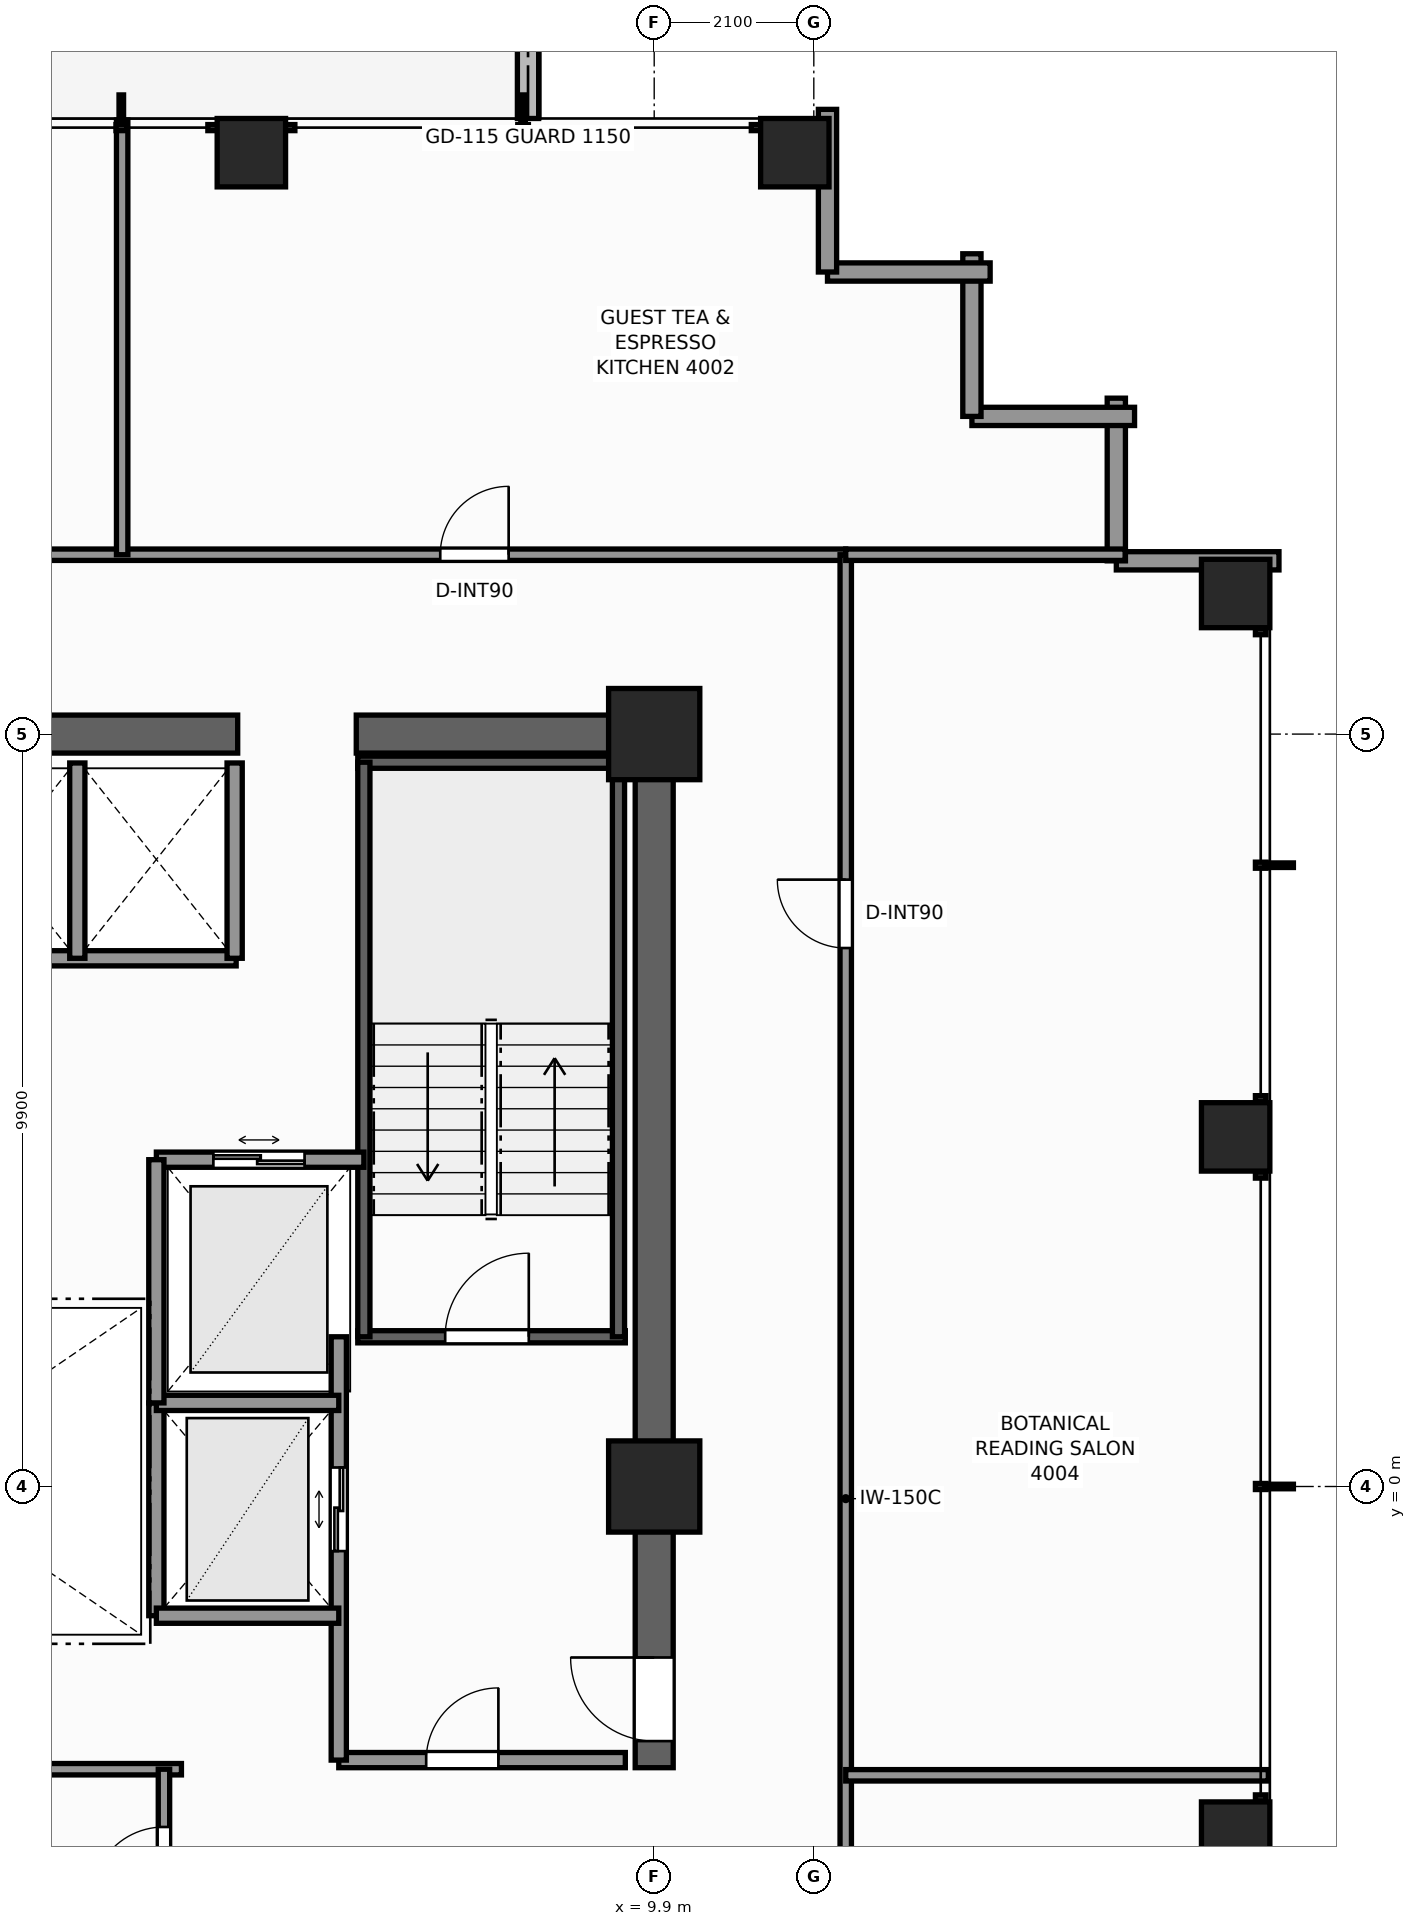
"""IFC4 building model, lengths in metres.
Left out: names, types, materials, properties, quantities, classifications, styles, units other than length and angle.
Written with IfcOpenShell. Run it as: python <this file> out.ifc"""

import sys

from ifc_helpers import new_model, si_unit, direction, frame, frame_2d, origin, origin_2d, place, context, subcontext, project, spatial, rectangle, extrude, element, fill, save


model = new_model("IFC4")
c1 = context("Model", 3, precision=1e-05, world=origin(), true_north=direction((0.0, 1.0)))
c2 = subcontext(c1, "Body", "Model", "MODEL_VIEW")
j1 = project(units=[si_unit("LENGTHUNIT", "METRE"), si_unit("PLANEANGLEUNIT", "RADIAN")], contexts=[c1])
p1 = place(None, origin())
s1 = spatial("IfcSite", under=j1, at=p1, CompositionType="ELEMENT")
p2 = place(p1, origin())
s2 = spatial("IfcBuilding", under=s1, at=p2, CompositionType="ELEMENT")
p3 = place(p2, frame((0.0, 0.0, 138.2)))
s3 = spatial("IfcBuildingStorey", under=s2, at=p3, CompositionType="ELEMENT", Elevation=138.2)
p4 = place(p3, frame((-10.15, 9.9, 0.0), z_axis=(0.0, 0.0, 1.0), x_axis=(1.0, 0.0, 0.0)))
e1 = element("IfcWall", 1, at=p4, inside=s3, PredefinedType="SHEAR", context=c2, shape_type="SweptSolid", body=[
    extrude(rectangle(XDim=14.57, YDim=0.5, at=frame_2d((7.285, 0.0))), origin(), (0.0, 0.0, 1.0), 3.3),
])
p5 = place(p3, frame((5.98, 9.9, 0.0), z_axis=(0.0, 0.0, 1.0), x_axis=(1.0, 0.0, 0.0)))
e2 = element("IfcWall", 2, at=p5, inside=s3, PredefinedType="SHEAR", context=c2, shape_type="SweptSolid", body=[
    extrude(rectangle(XDim=4.17, YDim=0.5, at=frame_2d((2.085, 0.0))), origin(), (0.0, 0.0, 1.0), 3.3),
])
p6 = place(p3, frame((9.9, -3.7, 0.0), z_axis=(0.0, 0.0, 1.0), x_axis=(0.0, 1.0, 0.0)))
e3 = element("IfcWall", 3, at=p6, inside=s3, PredefinedType="SHEAR", context=c2, shape_type="SweptSolid", body=[
    extrude(rectangle(XDim=13.35, YDim=0.5, at=frame_2d((6.675, 0.0))), origin(), (0.0, 0.0, 1.0), 3.3),
])
p7 = place(p6, frame((0.35, 0.0, 0.0)))
e4 = element("IfcOpeningElement", 4, at=p7, cuts=e3, PredefinedType="OPENING", context=c2, shape_type="SweptSolid", body=[
    extrude(rectangle(XDim=1.1, YDim=2.2, at=frame_2d((0.55, 1.1))), frame((0.0, 0.26, 0.0), z_axis=(0.0, -1.0, 0.0), x_axis=(1.0, 0.0, 0.0)), (0.0, 0.0, 1.0), 0.52),
])
for number, where, z_axis, x_axis in (
    (5, (9.9, 9.9, 0.0), (0.0, 0.0, 1.0), (1.0, 0.0, 0.0)),
    (6, (9.9, 0.0, 0.0), (0.0, 0.0, 1.0), (1.0, 0.0, 0.0)),
):
    element("IfcColumn", number, at=place(p3, frame(where, z_axis=z_axis, x_axis=x_axis)), inside=s3, PredefinedType="COLUMN", context=c2, shape_type="SweptSolid", body=[
        extrude(rectangle(XDim=1.2, YDim=1.2, at=origin_2d()), origin(), (0.0, 0.0, 1.0), 3.3),
    ])
for number, where, z_axis, x_axis in (
    (7, (4.6, 17.55, 0.0), (0.0, 0.0, 1.0), (1.0, 0.0, 0.0)),
    (8, (11.75, 17.55, 0.0), (0.0, 0.0, 1.0), (1.0, 0.0, 0.0)),
    (9, (17.55, -4.6, 0.0), (0.0, 0.0, 1.0), (1.0, 0.0, 0.0)),
    (10, (17.55, 4.6, 0.0), (0.0, 0.0, 1.0), (1.0, 0.0, 0.0)),
    (11, (17.55, 11.75, 0.0), (0.0, 0.0, 1.0), (1.0, 0.0, 0.0)),
):
    element("IfcColumn", number, at=place(p3, frame(where, z_axis=z_axis, x_axis=x_axis)), inside=s3, PredefinedType="COLUMN", context=c2, shape_type="SweptSolid", body=[
        extrude(rectangle(XDim=0.9, YDim=0.9, at=origin_2d()), origin(), (0.0, 0.0, 1.0), 3.3),
    ])
p8 = place(p3, frame((8.24, 18.0, -0.02), z_axis=(0.0, 0.0, 1.0), x_axis=(0.0, 1.0, 0.0)))
e12 = element("IfcWall", 12, at=p8, inside=s3, PredefinedType="PARAPET", context=c2, shape_type="SweptSolid", body=[
    extrude(rectangle(XDim=2.975, YDim=0.28, at=frame_2d((1.487, 0.0))), origin(), (0.0, 0.0, 1.0), 0.42),
])
for number, where, z_axis, x_axis in (
    (13, (15.98, 12.18, 0.0), (0.0, 0.0, 1.0), (1.0, 0.0, 0.0)),
    (14, (15.98, 14.32, 0.0), (0.0, 0.0, 1.0), (0.0, -1.0, 0.0)),
):
    element("IfcWall", number, at=place(p3, frame(where, z_axis=z_axis, x_axis=x_axis)), inside=s3, PredefinedType="STANDARD", context=c2, shape_type="SweptSolid", body=[
        extrude(rectangle(XDim=2.14, YDim=0.24, at=frame_2d((1.07, 0.0))), origin(), (0.0, 0.0, 1.0), 2.479),
    ])
for number, where, z_axis, x_axis in (
    (15, (14.08, 14.08, 0.0), (0.0, 0.0, 1.0), (1.0, 0.0, 0.0)),
    (16, (14.08, 16.22, 0.0), (0.0, 0.0, 1.0), (0.0, -1.0, 0.0)),
):
    element("IfcWall", number, at=place(p3, frame(where, z_axis=z_axis, x_axis=x_axis)), inside=s3, PredefinedType="STANDARD", context=c2, shape_type="SweptSolid", body=[
        extrude(rectangle(XDim=2.14, YDim=0.24, at=frame_2d((1.07, 0.0))), origin(), (0.0, 0.0, 1.0), 2.479),
    ])
for number, where, z_axis, x_axis in (
    (17, (12.18, 15.98, 0.0), (0.0, 0.0, 1.0), (1.0, 0.0, 0.0)),
    (18, (12.18, 18.12, 0.0), (0.0, 0.0, 1.0), (0.0, -1.0, 0.0)),
):
    element("IfcWall", number, at=place(p3, frame(where, z_axis=z_axis, x_axis=x_axis)), inside=s3, PredefinedType="STANDARD", context=c2, shape_type="SweptSolid", body=[
        extrude(rectangle(XDim=2.14, YDim=0.24, at=frame_2d((1.07, 0.0))), origin(), (0.0, 0.0, 1.0), 2.479),
    ])
p9 = place(p3, frame((6.0, 1.97, 0.0), z_axis=(0.0, 0.0, 1.0), x_axis=(1.0, 0.0, 0.0)))
e19 = element("IfcWall", 19, at=p9, inside=s3, PredefinedType="SHEAR", context=c2, shape_type="SweptSolid", body=[
    extrude(rectangle(XDim=3.52, YDim=0.16, at=frame_2d((1.76, 0.0))), origin(), (0.0, 0.0, 1.0), 3.3),
])
p10 = place(p9, frame((1.15, 0.0, 0.0)))
e20 = element("IfcOpeningElement", 20, at=p10, cuts=e19, PredefinedType="OPENING", context=c2, shape_type="SweptSolid", body=[
    extrude(rectangle(XDim=1.1, YDim=2.2, at=frame_2d((0.55, 1.1))), frame((0.0, 0.09, 0.0), z_axis=(0.0, -1.0, 0.0), x_axis=(1.0, 0.0, 0.0)), (0.0, 0.0, 1.0), 0.18),
])
p11 = place(p3, frame((6.0, 9.53, 0.0), z_axis=(0.0, 0.0, 1.0), x_axis=(1.0, 0.0, 0.0)))
e21 = element("IfcWall", 21, at=p11, inside=s3, PredefinedType="SHEAR", context=c2, shape_type="SweptSolid", body=[
    extrude(rectangle(XDim=3.52, YDim=0.16, at=frame_2d((1.76, 0.0))), origin(), (0.0, 0.0, 1.0), 3.3),
])
for number, where, z_axis, x_axis in (
    (22, (6.08, 1.97, 0.0), (0.0, 0.0, 1.0), (0.0, 1.0, 0.0)),
    (23, (9.43, 1.97, 0.0), (0.0, 0.0, 1.0), (0.0, 1.0, 0.0)),
):
    element("IfcWall", number, at=place(p3, frame(where, z_axis=z_axis, x_axis=x_axis)), inside=s3, PredefinedType="SHEAR", context=c2, shape_type="SweptSolid", body=[
        extrude(rectangle(XDim=7.56, YDim=0.16, at=frame_2d((3.78, 0.0))), origin(), (0.0, 0.0, 1.0), 3.3),
    ])
p12 = place(p3, frame((5.75, -3.6, 0.0), z_axis=(0.0, 0.0, 1.0), x_axis=(1.0, 0.0, 0.0)))
e24 = element("IfcWall", 24, at=p12, inside=s3, PredefinedType="SOLIDWALL", context=c2, shape_type="SweptSolid", body=[
    extrude(rectangle(XDim=3.77, YDim=0.2, at=frame_2d((1.885, 0.0))), origin(), (0.0, 0.0, 1.0), 3.1),
])
p13 = place(p12, frame((1.15, 0.0, 0.0)))
e25 = element("IfcOpeningElement", 25, at=p13, cuts=e24, PredefinedType="OPENING", context=c2, shape_type="SweptSolid", body=[
    extrude(rectangle(XDim=0.95, YDim=2.06, at=frame_2d((0.475, 1.03))), frame((0.0, 0.11, 0.0), z_axis=(0.0, -1.0, 0.0), x_axis=(1.0, 0.0, 0.0)), (0.0, 0.0, 1.0), 0.22),
])
p14 = place(p3, frame((5.75, -3.6, 0.0), z_axis=(0.0, 0.0, 1.0), x_axis=(0.0, 1.0, 0.0)))
e26 = element("IfcWall", 26, at=p14, inside=s3, PredefinedType="SOLIDWALL", context=c2, shape_type="SweptSolid", body=[
    extrude(rectangle(XDim=5.57, YDim=0.2, at=frame_2d((2.785, 0.0))), origin(), (0.0, 0.0, 1.0), 2.735),
])
p15 = place(p14, frame((2.75, 0.0, 0.0)))
e27 = element("IfcOpeningElement", 27, at=p15, cuts=e26, PredefinedType="OPENING", context=c2, shape_type="SweptSolid", body=[
    extrude(rectangle(XDim=1.1, YDim=2.2, at=frame_2d((0.55, 1.1))), frame((0.0, 0.11, 0.0), z_axis=(0.0, -1.0, 0.0), x_axis=(1.0, 0.0, 0.0)), (0.0, 0.0, 1.0), 0.22),
])
p16 = place(p3, frame((3.35, -1.7, 0.0), z_axis=(0.0, 0.0, 1.0), x_axis=(0.0, 1.0, 0.0)))
e28 = element("IfcWall", 28, at=p16, inside=s3, PredefinedType="SOLIDWALL", context=c2, shape_type="SweptSolid", body=[
    extrude(rectangle(XDim=2.8, YDim=0.2, at=frame_2d((1.4, 0.0))), origin(), (0.0, 0.0, 1.0), 2.735),
])
for number, where, z_axis, x_axis in (
    (29, (3.35, -1.7, 0.0), (0.0, 0.0, 1.0), (1.0, 0.0, 0.0)),
    (30, (3.35, 1.1, 0.0), (0.0, 0.0, 1.0), (1.0, 0.0, 0.0)),
):
    element("IfcWall", number, at=place(p3, frame(where, z_axis=z_axis, x_axis=x_axis)), inside=s3, PredefinedType="SOLIDWALL", context=c2, shape_type="SweptSolid", body=[
        extrude(rectangle(XDim=2.4, YDim=0.2, at=frame_2d((1.2, 0.0))), origin(), (0.0, 0.0, 1.0), 3.1),
    ])
p17 = place(p3, frame((3.35, 4.3, 0.0), z_axis=(0.0, 0.0, 1.0), x_axis=(1.0, 0.0, 0.0)))
e31 = element("IfcWall", 31, at=p17, inside=s3, PredefinedType="SOLIDWALL", context=c2, shape_type="SweptSolid", body=[
    extrude(rectangle(XDim=2.73, YDim=0.2, at=frame_2d((1.365, 0.0))), origin(), (0.0, 0.0, 1.0), 3.1),
])
p18 = place(p17, frame((0.75, 0.0, 0.0)))
e32 = element("IfcOpeningElement", 32, at=p18, cuts=e31, PredefinedType="OPENING", context=c2, shape_type="SweptSolid", body=[
    extrude(rectangle(XDim=1.2, YDim=2.25, at=frame_2d((0.6, 1.125))), frame((0.0, 0.11, 0.0), z_axis=(0.0, -1.0, 0.0), x_axis=(1.0, 0.0, 0.0)), (0.0, 0.0, 1.0), 0.22),
])
p19 = place(p3, frame((3.35, 1.1, 0.0), z_axis=(0.0, 0.0, 1.0), x_axis=(0.0, 1.0, 0.0)))
e33 = element("IfcWall", 33, at=p19, inside=s3, PredefinedType="SOLIDWALL", context=c2, shape_type="SweptSolid", body=[
    extrude(rectangle(XDim=3.2, YDim=0.2, at=frame_2d((1.6, 0.0))), origin(), (0.0, 0.0, 1.0), 2.735),
])
p20 = place(p3, frame((0.22, 6.95, 0.0), z_axis=(0.0, 0.0, 1.0), x_axis=(1.0, 0.0, 0.0)))
e34 = element("IfcWall", 34, at=p20, inside=s3, PredefinedType="SOLIDWALL", context=c2, shape_type="SweptSolid", body=[
    extrude(rectangle(XDim=4.18, YDim=0.2, at=frame_2d((2.09, 0.0))), origin(), (0.0, 0.0, 1.0), 3.1),
])
for number, where, z_axis, x_axis in (
    (35, (4.38, 6.95, 0.0), (0.0, 0.0, 1.0), (0.0, 1.0, 0.0)),
    (36, (2.31, 6.95, 0.0), (0.0, 0.0, 1.0), (0.0, 1.0, 0.0)),
):
    element("IfcWall", number, at=place(p3, frame(where, z_axis=z_axis, x_axis=x_axis)), inside=s3, PredefinedType="SOLIDWALL", context=c2, shape_type="SweptSolid", body=[
        extrude(rectangle(XDim=2.57, YDim=0.2, at=frame_2d((1.285, 0.0))), origin(), (0.0, 0.0, 1.0), 3.1),
    ])
p21 = place(p3, frame((-3.68, -3.72, 0.0), z_axis=(0.0, 0.0, 1.0), x_axis=(1.0, 0.0, 0.0)))
e37 = element("IfcWall", 37, at=p21, inside=s3, PredefinedType="PARTITIONING", context=c2, shape_type="SweptSolid", body=[
    extrude(rectangle(XDim=7.36, YDim=0.15, at=frame_2d((3.68, 0.0))), origin(), (0.0, 0.0, 1.0), 3.1),
])
p22 = place(p3, frame((3.45, -6.08, 0.0), z_axis=(0.0, 0.0, 1.0), x_axis=(0.0, 1.0, 0.0)))
e38 = element("IfcWall", 38, at=p22, inside=s3, PredefinedType="PARTITIONING", context=c2, shape_type="SweptSolid", body=[
    extrude(rectangle(XDim=2.36, YDim=0.15, at=frame_2d((1.18, 0.0))), origin(), (0.0, 0.0, 1.0), 3.1),
])
p23 = place(p22, frame((0.65, 0.0, 0.0)))
e39 = element("IfcOpeningElement", 39, at=p23, cuts=e38, PredefinedType="OPENING", context=c2, shape_type="SweptSolid", body=[
    extrude(rectangle(XDim=0.95, YDim=2.06, at=frame_2d((0.475, 1.03))), frame((0.0, 0.085, 0.0), z_axis=(0.0, -1.0, 0.0), x_axis=(1.0, 0.0, 0.0)), (0.0, 0.0, 1.0), 0.17),
])
p24 = place(p3, frame((-12.26, 12.26, 0.0), z_axis=(0.0, 0.0, 1.0), x_axis=(1.0, 0.0, 0.0)))
e40 = element("IfcWall", 40, at=p24, inside=s3, PredefinedType="PARTITIONING", context=c2, shape_type="SweptSolid", body=[
    extrude(rectangle(XDim=24.68, YDim=0.15, at=frame_2d((12.34, 0.0))), origin(), (0.0, 0.0, 1.0), 2.312),
])
p25 = place(p24, frame((4.275, 0.0, 0.0)))
e41 = element("IfcOpeningElement", 41, at=p25, cuts=e40, PredefinedType="OPENING", context=c2, shape_type="SweptSolid", body=[
    extrude(rectangle(XDim=0.9, YDim=2.06, at=frame_2d((0.45, 1.03))), frame((0.0, 0.085, 0.0), z_axis=(0.0, -1.0, 0.0), x_axis=(1.0, 0.0, 0.0)), (0.0, 0.0, 1.0), 0.17),
])
p26 = place(p24, frame((19.345, 0.0, 0.0)))
e42 = element("IfcOpeningElement", 42, at=p26, cuts=e40, PredefinedType="OPENING", context=c2, shape_type="SweptSolid", body=[
    extrude(rectangle(XDim=0.9, YDim=2.06, at=frame_2d((0.45, 1.03))), frame((0.0, 0.085, 0.0), z_axis=(0.0, -1.0, 0.0), x_axis=(1.0, 0.0, 0.0)), (0.0, 0.0, 1.0), 0.17),
])
p27 = place(p3, frame((12.42, -12.58, 0.0), z_axis=(0.0, 0.0, 1.0), x_axis=(0.0, 1.0, 0.0)))
e43 = element("IfcWall", 43, at=p27, inside=s3, PredefinedType="PARTITIONING", context=c2, shape_type="SweptSolid", body=[
    extrude(rectangle(XDim=24.84, YDim=0.15, at=frame_2d((12.42, 0.0))), origin(), (0.0, 0.0, 1.0), 2.312),
])
p28 = place(p27, frame((4.595, 0.0, 0.0)))
e44 = element("IfcOpeningElement", 44, at=p28, cuts=e43, PredefinedType="OPENING", context=c2, shape_type="SweptSolid", body=[
    extrude(rectangle(XDim=0.9, YDim=2.06, at=frame_2d((0.45, 1.03))), frame((0.0, 0.085, 0.0), z_axis=(0.0, -1.0, 0.0), x_axis=(1.0, 0.0, 0.0)), (0.0, 0.0, 1.0), 0.17),
])
p29 = place(p27, frame((19.665, 0.0, 0.0)))
e45 = element("IfcOpeningElement", 45, at=p29, cuts=e43, PredefinedType="OPENING", context=c2, shape_type="SweptSolid", body=[
    extrude(rectangle(XDim=0.9, YDim=2.06, at=frame_2d((0.45, 1.03))), frame((0.0, 0.085, 0.0), z_axis=(0.0, -1.0, 0.0), x_axis=(1.0, 0.0, 0.0)), (0.0, 0.0, 1.0), 0.17),
])
p30 = place(p3, frame((12.42, 12.26, 0.0), z_axis=(0.0, 0.0, 1.0), x_axis=(1.0, 0.0, 0.0)))
e46 = element("IfcWall", 46, at=p30, inside=s3, PredefinedType="PARTITIONING", context=c2, shape_type="SweptSolid", body=[
    extrude(rectangle(XDim=3.676, YDim=0.15, at=frame_2d((1.838, 0.0))), origin(), (0.0, 0.0, 1.0), 3.1),
])
p31 = place(p3, frame((2.9, 12.26, 0.0), z_axis=(0.0, 0.0, 1.0), x_axis=(0.0, 1.0, 0.0)))
e47 = element("IfcWall", 47, at=p31, inside=s3, PredefinedType="PARTITIONING", context=c2, shape_type="SweptSolid", body=[
    extrude(rectangle(XDim=5.72, YDim=0.15, at=frame_2d((2.86, 0.0))), origin(), (0.0, 0.0, 1.0), 2.469),
])
p32 = place(p3, frame((12.42, -3.8, 0.0), z_axis=(0.0, 0.0, 1.0), x_axis=(1.0, 0.0, 0.0)))
e48 = element("IfcWall", 48, at=p32, inside=s3, PredefinedType="PARTITIONING", context=c2, shape_type="SweptSolid", body=[
    extrude(rectangle(XDim=5.56, YDim=0.15, at=frame_2d((2.78, 0.0))), origin(), (0.0, 0.0, 1.0), 2.469),
])
p33 = place(p10, origin())
e49 = element("IfcDoor", 49, at=p33, inside=s3, OperationType="SINGLE_SWING_RIGHT", PredefinedType="DOOR", context=c2, shape_type="SweptSolid", body=[
    extrude(rectangle(XDim=1.1, YDim=2.2, at=frame_2d((0.55, 1.1))), frame((0.0, 0.025, 0.0), z_axis=(0.0, -1.0, 0.0), x_axis=(1.0, 0.0, 0.0)), (0.0, 0.0, 1.0), 0.05),
])
fill(e20, e49)
p34 = place(p7, origin())
e50 = element("IfcDoor", 50, at=p34, inside=s3, OperationType="SINGLE_SWING_RIGHT", PredefinedType="DOOR", context=c2, shape_type="SweptSolid", body=[
    extrude(rectangle(XDim=1.1, YDim=2.2, at=frame_2d((0.55, 1.1))), frame((0.0, 0.025, 0.0), z_axis=(0.0, -1.0, 0.0), x_axis=(1.0, 0.0, 0.0)), (0.0, 0.0, 1.0), 0.05),
])
fill(e4, e50)
p35 = place(p15, origin())
e51 = element("IfcDoor", 51, at=p35, inside=s3, OperationType="DOUBLE_DOOR_SLIDING", PredefinedType="DOOR", context=c2, shape_type="SweptSolid", body=[
    extrude(rectangle(XDim=1.1, YDim=2.2, at=frame_2d((0.55, 1.1))), frame((0.0, 0.025, 0.0), z_axis=(0.0, -1.0, 0.0), x_axis=(1.0, 0.0, 0.0)), (0.0, 0.0, 1.0), 0.05),
])
fill(e27, e51)
p36 = place(p18, origin())
e52 = element("IfcDoor", 52, at=p36, inside=s3, OperationType="DOUBLE_DOOR_SLIDING", PredefinedType="DOOR", context=c2, shape_type="SweptSolid", body=[
    extrude(rectangle(XDim=1.2, YDim=2.25, at=frame_2d((0.6, 1.125))), frame((0.0, 0.025, 0.0), z_axis=(0.0, -1.0, 0.0), x_axis=(1.0, 0.0, 0.0)), (0.0, 0.0, 1.0), 0.05),
])
fill(e32, e52)
p37 = place(p13, origin())
e53 = element("IfcDoor", 53, at=p37, inside=s3, OperationType="SINGLE_SWING_RIGHT", PredefinedType="DOOR", context=c2, shape_type="SweptSolid", body=[
    extrude(rectangle(XDim=0.95, YDim=2.06, at=frame_2d((0.475, 1.03))), frame((0.0, 0.025, 0.0), z_axis=(0.0, -1.0, 0.0), x_axis=(1.0, 0.0, 0.0)), (0.0, 0.0, 1.0), 0.05),
])
fill(e25, e53)
p38 = place(p23, origin())
e54 = element("IfcDoor", 54, at=p38, inside=s3, OperationType="SINGLE_SWING_LEFT", PredefinedType="DOOR", context=c2, shape_type="SweptSolid", body=[
    extrude(rectangle(XDim=0.95, YDim=2.06, at=frame_2d((0.475, 1.03))), frame((0.0, 0.025, 0.0), z_axis=(0.0, -1.0, 0.0), x_axis=(1.0, 0.0, 0.0)), (0.0, 0.0, 1.0), 0.05),
])
fill(e39, e54)
p39 = place(p26, origin())
e55 = element("IfcDoor", 55, at=p39, inside=s3, OperationType="SINGLE_SWING_RIGHT", PredefinedType="DOOR", context=c2, shape_type="SweptSolid", body=[
    extrude(rectangle(XDim=0.9, YDim=2.06, at=frame_2d((0.45, 1.03))), frame((0.0, 0.025, 0.0), z_axis=(0.0, -1.0, 0.0), x_axis=(1.0, 0.0, 0.0)), (0.0, 0.0, 1.0), 0.05),
])
fill(e42, e55)
p40 = place(p29, origin())
e56 = element("IfcDoor", 56, at=p40, inside=s3, OperationType="SINGLE_SWING_RIGHT", PredefinedType="DOOR", context=c2, shape_type="SweptSolid", body=[
    extrude(rectangle(XDim=0.9, YDim=2.06, at=frame_2d((0.45, 1.03))), frame((0.0, 0.025, 0.0), z_axis=(0.0, -1.0, 0.0), x_axis=(1.0, 0.0, 0.0)), (0.0, 0.0, 1.0), 0.05),
])
fill(e45, e56)
save(model, sys.argv[1])
